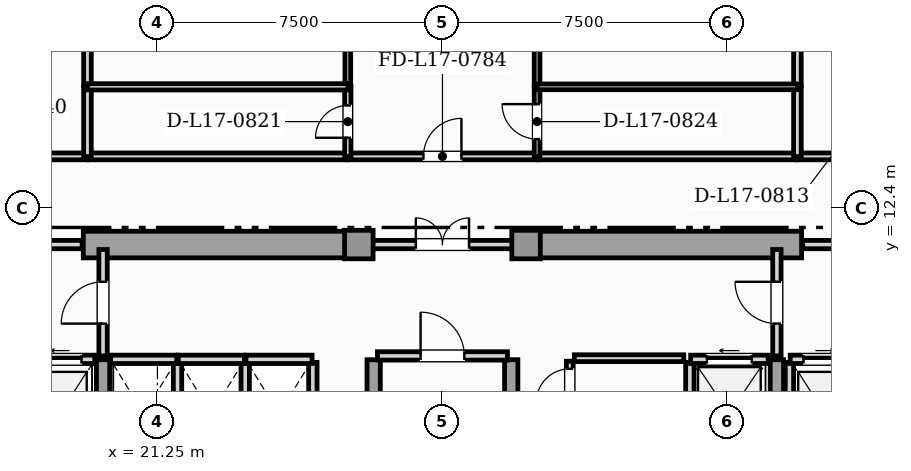
"""IFC4 building model, lengths in metres.
Left out: names, types, materials, properties, quantities, classifications, styles, units other than length and angle.
Written with IfcOpenShell. Run it as: python <this file> out.ifc"""

import sys

from ifc_helpers import new_model, si_unit, direction, frame, frame_2d, origin, origin_2d, place, context, subcontext, project, spatial, rectangle, extrude, element, fill, save


model = new_model("IFC4")
c1 = context("Model", 3, precision=1e-05, world=origin(), true_north=direction((0.0, 1.0)))
c2 = subcontext(c1, "Body", "Model", "MODEL_VIEW")
j1 = project(units=[si_unit("LENGTHUNIT", "METRE"), si_unit("PLANEANGLEUNIT", "RADIAN")], contexts=[c1])
p1 = place(None, origin())
s1 = spatial("IfcSite", under=j1, at=p1, CompositionType="ELEMENT")
p2 = place(p1, origin())
s2 = spatial("IfcBuilding", under=s1, at=p2, CompositionType="ELEMENT")
p3 = place(p2, frame((0.0, 0.0, 72.15)))
s3 = spatial("IfcBuildingStorey", under=s2, at=p3, CompositionType="ELEMENT", Elevation=72.15)
for number, where, z_axis, x_axis in (
    (1, (19.3, 11.45, 0.0), (0.0, 0.0, 1.0), (1.0, 0.0, 0.0)),
    (2, (30.9, 11.45, 0.0), (0.0, 0.0, 1.0), (1.0, 0.0, 0.0)),
):
    element("IfcWall", number, at=place(p3, frame(where, z_axis=z_axis, x_axis=x_axis)), inside=s3, PredefinedType="SHEAR", context=c2, shape_type="SweptSolid", body=[
        extrude(rectangle(XDim=7.3, YDim=0.7, at=frame_2d((3.65, 0.0))), origin(), (0.0, 0.0, 1.0), 3.57),
    ])
for number, where, z_axis, x_axis in (
    (3, (19.82, 0.92, 0.0), (0.0, 0.0, 1.0), (0.0, 1.0, 0.0)),
    (4, (26.94, 0.92, 0.0), (0.0, 0.0, 1.0), (0.0, 1.0, 0.0)),
    (5, (30.56, 0.92, 0.0), (0.0, 0.0, 1.0), (0.0, 1.0, 0.0)),
    (6, (37.55, 0.92, 0.0), (0.0, 0.0, 1.0), (0.0, 1.0, 0.0)),
):
    element("IfcWall", number, at=place(p3, frame(where, z_axis=z_axis, x_axis=x_axis)), inside=s3, PredefinedType="SHEAR", context=c2, shape_type="SweptSolid", body=[
        extrude(rectangle(XDim=7.5, YDim=0.35, at=frame_2d((3.75, 0.0))), origin(), (0.0, 0.0, 1.0), 3.57),
    ])
for number, where, z_axis, x_axis in (
    (7, (26.55, 11.45, 0.0), (0.0, 0.0, 1.0), (1.0, 0.0, 0.0)),
    (8, (30.95, 11.45, 0.0), (0.0, 0.0, 1.0), (1.0, 0.0, 0.0)),
):
    element("IfcColumn", number, at=place(p3, frame(where, z_axis=z_axis, x_axis=x_axis)), inside=s3, PredefinedType="COLUMN", context=c2, shape_type="SweptSolid", body=[
        extrude(rectangle(XDim=0.75, YDim=0.75, at=origin_2d()), origin(), (0.0, 0.0, 1.0), 3.85),
    ])
p4 = place(p3, frame((17.78, 8.43, 0.0), z_axis=(0.0, 0.0, 1.0), x_axis=(1.0, 0.0, 0.0)))
e9 = element("IfcWall", 9, at=p4, inside=s3, PredefinedType="SOLIDWALL", context=c2, shape_type="SweptSolid", body=[
    extrude(rectangle(XDim=1.82, YDim=0.22, at=frame_2d((0.91, 0.0))), origin(), (0.0, 0.0, 1.0), 3.57),
])
p5 = place(p4, frame((0.35, 0.0, 0.0)))
e10 = element("IfcOpeningElement", 10, at=p5, cuts=e9, PredefinedType="OPENING", context=c2, shape_type="SweptSolid", body=[
    extrude(rectangle(XDim=1.12, YDim=2.25, at=frame_2d((0.56, 1.125))), frame((0.0, 0.12, 0.0), z_axis=(0.0, -1.0, 0.0), x_axis=(1.0, 0.0, 0.0)), (0.0, 0.0, 1.0), 0.24),
])
p6 = place(p3, frame((37.88, 5.65, 0.0), z_axis=(0.0, 0.0, 1.0), x_axis=(0.0, 1.0, 0.0)))
e11 = element("IfcWall", 11, at=p6, inside=s3, PredefinedType="SOLIDWALL", context=c2, shape_type="SweptSolid", body=[
    extrude(rectangle(XDim=2.7, YDim=0.22, at=frame_2d((1.35, 0.0))), origin(), (0.0, 0.0, 1.0), 3.57),
])
p7 = place(p3, frame((37.9, 8.43, 0.0), z_axis=(0.0, 0.0, 1.0), x_axis=(1.0, 0.0, 0.0)))
e12 = element("IfcWall", 12, at=p7, inside=s3, PredefinedType="SOLIDWALL", context=c2, shape_type="SweptSolid", body=[
    extrude(rectangle(XDim=1.82, YDim=0.22, at=frame_2d((0.91, 0.0))), origin(), (0.0, 0.0, 1.0), 3.57),
])
p8 = place(p7, frame((0.35, 0.0, 0.0)))
e13 = element("IfcOpeningElement", 13, at=p8, cuts=e12, PredefinedType="OPENING", context=c2, shape_type="SweptSolid", body=[
    extrude(rectangle(XDim=1.12, YDim=2.25, at=frame_2d((0.56, 1.125))), frame((0.0, 0.12, 0.0), z_axis=(0.0, -1.0, 0.0), x_axis=(1.0, 0.0, 0.0)), (0.0, 0.0, 1.0), 0.24),
])
p9 = place(p3, frame((35.26, 5.65, 0.0), z_axis=(0.0, 0.0, 1.0), x_axis=(0.0, 1.0, 0.0)))
e14 = element("IfcWall", 14, at=p9, inside=s3, PredefinedType="SOLIDWALL", context=c2, shape_type="SweptSolid", body=[
    extrude(rectangle(XDim=2.7, YDim=0.22, at=frame_2d((1.35, 0.0))), origin(), (0.0, 0.0, 1.0), 3.57),
])
p10 = place(p3, frame((35.28, 8.43, 0.0), z_axis=(0.0, 0.0, 1.0), x_axis=(1.0, 0.0, 0.0)))
e15 = element("IfcWall", 15, at=p10, inside=s3, PredefinedType="SOLIDWALL", context=c2, shape_type="SweptSolid", body=[
    extrude(rectangle(XDim=2.04, YDim=0.22, at=frame_2d((1.02, 0.0))), origin(), (0.0, 0.0, 1.0), 3.57),
])
p11 = place(p10, frame((0.43, 0.0, 0.0)))
e16 = element("IfcOpeningElement", 16, at=p11, cuts=e15, PredefinedType="OPENING", context=c2, shape_type="SweptSolid", body=[
    extrude(rectangle(XDim=1.18, YDim=2.2, at=frame_2d((0.59, 1.1))), frame((0.0, 0.12, 0.0), z_axis=(0.0, -1.0, 0.0), x_axis=(1.0, 0.0, 0.0)), (0.0, 0.0, 1.0), 0.24),
])
p12 = place(p3, frame((21.78, 5.65, 0.0), z_axis=(0.0, 0.0, 1.0), x_axis=(0.0, 1.0, 0.0)))
e17 = element("IfcWall", 17, at=p12, inside=s3, PredefinedType="SOLIDWALL", context=c2, shape_type="SweptSolid", body=[
    extrude(rectangle(XDim=2.7, YDim=0.22, at=frame_2d((1.35, 0.0))), origin(), (0.0, 0.0, 1.0), 3.57),
])
p13 = place(p3, frame((20.02, 8.43, 0.0), z_axis=(0.0, 0.0, 1.0), x_axis=(1.0, 0.0, 0.0)))
e18 = element("IfcWall", 18, at=p13, inside=s3, PredefinedType="SOLIDWALL", context=c2, shape_type="SweptSolid", body=[
    extrude(rectangle(XDim=1.74, YDim=0.22, at=frame_2d((0.87, 0.0))), origin(), (0.0, 0.0, 1.0), 3.57),
])
p14 = place(p3, frame((23.56, 5.65, 0.0), z_axis=(0.0, 0.0, 1.0), x_axis=(0.0, 1.0, 0.0)))
e19 = element("IfcWall", 19, at=p14, inside=s3, PredefinedType="SOLIDWALL", context=c2, shape_type="SweptSolid", body=[
    extrude(rectangle(XDim=2.7, YDim=0.22, at=frame_2d((1.35, 0.0))), origin(), (0.0, 0.0, 1.0), 3.57),
])
p15 = place(p3, frame((21.8, 8.43, 0.0), z_axis=(0.0, 0.0, 1.0), x_axis=(1.0, 0.0, 0.0)))
e20 = element("IfcWall", 20, at=p15, inside=s3, PredefinedType="SOLIDWALL", context=c2, shape_type="SweptSolid", body=[
    extrude(rectangle(XDim=1.74, YDim=0.22, at=frame_2d((0.87, 0.0))), origin(), (0.0, 0.0, 1.0), 3.57),
])
p16 = place(p3, frame((25.34, 5.65, 0.0), z_axis=(0.0, 0.0, 1.0), x_axis=(0.0, 1.0, 0.0)))
e21 = element("IfcWall", 21, at=p16, inside=s3, PredefinedType="SOLIDWALL", context=c2, shape_type="SweptSolid", body=[
    extrude(rectangle(XDim=2.7, YDim=0.22, at=frame_2d((1.35, 0.0))), origin(), (0.0, 0.0, 1.0), 3.57),
])
p17 = place(p3, frame((23.58, 8.43, 0.0), z_axis=(0.0, 0.0, 1.0), x_axis=(1.0, 0.0, 0.0)))
e22 = element("IfcWall", 22, at=p17, inside=s3, PredefinedType="SOLIDWALL", context=c2, shape_type="SweptSolid", body=[
    extrude(rectangle(XDim=1.74, YDim=0.22, at=frame_2d((0.87, 0.0))), origin(), (0.0, 0.0, 1.0), 3.57),
])
p18 = place(p3, frame((27.04, 8.52, 0.0), z_axis=(0.0, 0.0, 1.0), x_axis=(1.0, 0.0, 0.0)))
e23 = element("IfcWall", 23, at=p18, inside=s3, PredefinedType="SOLIDWALL", context=c2, shape_type="SweptSolid", body=[
    extrude(rectangle(XDim=3.42, YDim=0.22, at=frame_2d((1.71, 0.0))), origin(), (0.0, 0.0, 1.0), 3.57),
])
p19 = place(p18, frame((1.135, 0.0, 0.0)))
e24 = element("IfcOpeningElement", 24, at=p19, cuts=e23, PredefinedType="OPENING", context=c2, shape_type="SweptSolid", body=[
    extrude(rectangle(XDim=1.15, YDim=2.2, at=frame_2d((0.575, 1.1))), frame((0.0, 0.12, 0.0), z_axis=(0.0, -1.0, 0.0), x_axis=(1.0, 0.0, 0.0)), (0.0, 0.0, 1.0), 0.24),
])
p20 = place(p3, frame((19.82, 8.52, 0.0), z_axis=(0.0, 0.0, 1.0), x_axis=(0.0, 1.0, 0.0)))
e25 = element("IfcWall", 25, at=p20, inside=s3, PredefinedType="SOLIDWALL", context=c2, shape_type="SweptSolid", body=[
    extrude(rectangle(XDim=2.8, YDim=0.22, at=frame_2d((1.4, 0.0))), origin(), (0.0, 0.0, 1.0), 3.026),
])
p21 = place(p20, frame((0.85, 0.0, 0.0)))
e26 = element("IfcOpeningElement", 26, at=p21, cuts=e25, PredefinedType="OPENING", context=c2, shape_type="SweptSolid", body=[
    extrude(rectangle(XDim=1.1, YDim=2.2, at=frame_2d((0.55, 1.1))), frame((0.0, 0.12, 0.0), z_axis=(0.0, -1.0, 0.0), x_axis=(1.0, 0.0, 0.0)), (0.0, 0.0, 1.0), 0.24),
])
p22 = place(p3, frame((37.55, 8.52, 0.0), z_axis=(0.0, 0.0, 1.0), x_axis=(0.0, 1.0, 0.0)))
e27 = element("IfcWall", 27, at=p22, inside=s3, PredefinedType="SOLIDWALL", context=c2, shape_type="SweptSolid", body=[
    extrude(rectangle(XDim=2.8, YDim=0.22, at=frame_2d((1.4, 0.0))), origin(), (0.0, 0.0, 1.0), 3.026),
])
p23 = place(p22, frame((0.85, 0.0, 0.0)))
e28 = element("IfcOpeningElement", 28, at=p23, cuts=e27, PredefinedType="OPENING", context=c2, shape_type="SweptSolid", body=[
    extrude(rectangle(XDim=1.1, YDim=2.2, at=frame_2d((0.55, 1.1))), frame((0.0, 0.12, 0.0), z_axis=(0.0, -1.0, 0.0), x_axis=(1.0, 0.0, 0.0)), (0.0, 0.0, 1.0), 0.24),
])
p24 = place(p3, frame((16.23, 11.45, 0.0), z_axis=(0.0, 0.0, 1.0), x_axis=(1.0, 0.0, 0.0)))
e29 = element("IfcWall", 29, at=p24, inside=s3, PredefinedType="SOLIDWALL", context=c2, shape_type="SweptSolid", body=[
    extrude(rectangle(XDim=3.04, YDim=0.22, at=frame_2d((1.52, 0.0))), origin(), (0.0, 0.0, 1.0), 3.57),
])
p25 = place(p24, frame((0.97, 0.0, 0.0)))
e30 = element("IfcOpeningElement", 30, at=p25, cuts=e29, PredefinedType="OPENING", context=c2, shape_type="SweptSolid", body=[
    extrude(rectangle(XDim=1.1, YDim=2.2, at=frame_2d((0.55, 1.1))), frame((0.0, 0.12, 0.0), z_axis=(0.0, -1.0, 0.0), x_axis=(1.0, 0.0, 0.0)), (0.0, 0.0, 1.0), 0.24),
])
p26 = place(p3, frame((26.63, 11.45, 0.0), z_axis=(0.0, 0.0, 1.0), x_axis=(1.0, 0.0, 0.0)))
e31 = element("IfcWall", 31, at=p26, inside=s3, PredefinedType="SOLIDWALL", context=c2, shape_type="SweptSolid", body=[
    extrude(rectangle(XDim=4.24, YDim=0.22, at=frame_2d((2.12, 0.0))), origin(), (0.0, 0.0, 1.0), 3.57),
])
p27 = place(p26, frame((1.42, 0.0, 0.0)))
e32 = element("IfcOpeningElement", 32, at=p27, cuts=e31, PredefinedType="OPENING", context=c2, shape_type="SweptSolid", body=[
    extrude(rectangle(XDim=1.4, YDim=2.2, at=frame_2d((0.7, 1.1))), frame((0.0, 0.12, 0.0), z_axis=(0.0, -1.0, 0.0), x_axis=(1.0, 0.0, 0.0)), (0.0, 0.0, 1.0), 0.24),
])
p28 = place(p3, frame((38.23, 11.45, 0.0), z_axis=(0.0, 0.0, 1.0), x_axis=(1.0, 0.0, 0.0)))
e33 = element("IfcWall", 33, at=p28, inside=s3, PredefinedType="SOLIDWALL", context=c2, shape_type="SweptSolid", body=[
    extrude(rectangle(XDim=3.04, YDim=0.22, at=frame_2d((1.52, 0.0))), origin(), (0.0, 0.0, 1.0), 3.57),
])
p29 = place(p28, frame((0.97, 0.0, 0.0)))
e34 = element("IfcOpeningElement", 34, at=p29, cuts=e33, PredefinedType="OPENING", context=c2, shape_type="SweptSolid", body=[
    extrude(rectangle(XDim=1.1, YDim=2.2, at=frame_2d((0.55, 1.1))), frame((0.0, 0.12, 0.0), z_axis=(0.0, -1.0, 0.0), x_axis=(1.0, 0.0, 0.0)), (0.0, 0.0, 1.0), 0.24),
])
p30 = place(p3, frame((32.1, 7.1, 0.0), z_axis=(0.0, 0.0, 1.0), x_axis=(0.0, 1.0, 0.0)))
e35 = element("IfcWall", 35, at=p30, inside=s3, PredefinedType="PARTITIONING", context=c2, shape_type="SweptSolid", body=[
    extrude(rectangle(XDim=1.28, YDim=0.18, at=frame_2d((0.64, 0.0))), origin(), (0.0, 0.0, 1.0), 3.57),
])
p31 = place(p30, frame((0.2, 0.0, 0.0)))
e36 = element("IfcOpeningElement", 36, at=p31, cuts=e35, PredefinedType="OPENING", context=c2, shape_type="SweptSolid", body=[
    extrude(rectangle(XDim=0.88, YDim=2.05, at=frame_2d((0.44, 1.025))), frame((0.0, 0.1, 0.0), z_axis=(0.0, -1.0, 0.0), x_axis=(1.0, 0.0, 0.0)), (0.0, 0.0, 1.0), 0.2),
])
p32 = place(p3, frame((32.22, 8.46, 0.0), z_axis=(0.0, 0.0, 1.0), x_axis=(1.0, 0.0, 0.0)))
e37 = element("IfcWall", 37, at=p32, inside=s3, PredefinedType="PARTITIONING", context=c2, shape_type="SweptSolid", body=[
    extrude(rectangle(XDim=2.88, YDim=0.18, at=frame_2d((1.44, 0.0))), origin(), (0.0, 0.0, 1.0), 3.57),
])
p33 = place(p3, frame((17.268, 13.77, 0.0), z_axis=(0.0, 0.0, 1.0), x_axis=(1.0, 0.0, 0.0)))
e38 = element("IfcWall", 38, at=p33, inside=s3, PredefinedType="PARTITIONING", context=c2, shape_type="SweptSolid", body=[
    extrude(rectangle(XDim=2.147, YDim=0.18, at=frame_2d((1.074, 0.0))), origin(), (0.0, 0.0, 1.0), 3.57),
])
p34 = place(p3, frame((38.085, 13.77, 0.0), z_axis=(0.0, 0.0, 1.0), x_axis=(1.0, 0.0, 0.0)))
e39 = element("IfcWall", 39, at=p34, inside=s3, PredefinedType="PARTITIONING", context=c2, shape_type="SweptSolid", body=[
    extrude(rectangle(XDim=2.162, YDim=0.18, at=frame_2d((1.081, 0.0))), origin(), (0.0, 0.0, 1.0), 3.57),
])
p35 = place(p3, frame((26.255, 13.77, 0.0), z_axis=(0.0, 0.0, 1.0), x_axis=(1.0, 0.0, 0.0)))
e40 = element("IfcWall", 40, at=p35, inside=s3, PredefinedType="PARTITIONING", context=c2, shape_type="SweptSolid", body=[
    extrude(rectangle(XDim=4.99, YDim=0.18, at=frame_2d((2.495, 0.0))), origin(), (0.0, 0.0, 1.0), 3.57),
])
p36 = place(p35, frame((1.995, 0.0, 0.0)))
e41 = element("IfcOpeningElement", 41, at=p36, cuts=e40, PredefinedType="OPENING", context=c2, shape_type="SweptSolid", body=[
    extrude(rectangle(XDim=1.0, YDim=2.15, at=frame_2d((0.5, 1.075))), frame((0.0, 0.1, 0.0), z_axis=(0.0, -1.0, 0.0), x_axis=(1.0, 0.0, 0.0)), (0.0, 0.0, 1.0), 0.2),
])
for number, where, z_axis, x_axis in (
    (42, (19.445, 13.77, 0.0), (0.0, 0.0, 1.0), (1.0, 0.0, 0.0)),
    (43, (31.275, 13.77, 0.0), (0.0, 0.0, 1.0), (1.0, 0.0, 0.0)),
):
    element("IfcWall", number, at=place(p3, frame(where, z_axis=z_axis, x_axis=x_axis)), inside=s3, PredefinedType="PARTITIONING", context=c2, shape_type="SweptSolid", body=[
        extrude(rectangle(XDim=6.78, YDim=0.18, at=frame_2d((3.39, 0.0))), origin(), (0.0, 0.0, 1.0), 3.57),
    ])
p37 = place(p3, frame((19.41, 13.765, 0.0), z_axis=(0.0, 0.0, 1.0), x_axis=(0.0, 1.0, 0.0)))
e44 = element("IfcWall", 44, at=p37, inside=s3, PredefinedType="PARTITIONING", context=c2, shape_type="SweptSolid", body=[
    extrude(rectangle(XDim=1.84, YDim=0.2, at=frame_2d((0.92, 0.0))), origin(), (0.0, 0.0, 1.0), 3.57),
])
p38 = place(p3, frame((19.41, 15.635, 0.0), z_axis=(0.0, 0.0, 1.0), x_axis=(0.0, 1.0, 0.0)))
e45 = element("IfcWall", 45, at=p38, inside=s3, PredefinedType="PARTITIONING", context=c2, shape_type="SweptSolid", body=[
    extrude(rectangle(XDim=3.127, YDim=0.2, at=frame_2d((1.563, 0.0))), origin(), (0.0, 0.0, 1.0), 3.57),
])
p39 = place(p3, frame((38.09, 13.765, 0.0), z_axis=(0.0, 0.0, 1.0), x_axis=(0.0, 1.0, 0.0)))
e46 = element("IfcWall", 46, at=p39, inside=s3, PredefinedType="PARTITIONING", context=c2, shape_type="SweptSolid", body=[
    extrude(rectangle(XDim=1.84, YDim=0.2, at=frame_2d((0.92, 0.0))), origin(), (0.0, 0.0, 1.0), 3.57),
])
p40 = place(p3, frame((38.09, 15.635, 0.0), z_axis=(0.0, 0.0, 1.0), x_axis=(0.0, 1.0, 0.0)))
e47 = element("IfcWall", 47, at=p40, inside=s3, PredefinedType="PARTITIONING", context=c2, shape_type="SweptSolid", body=[
    extrude(rectangle(XDim=1.6, YDim=0.2, at=frame_2d((0.8, 0.0))), origin(), (0.0, 0.0, 1.0), 3.57),
])
p41 = place(p3, frame((26.26, 13.765, 0.0), z_axis=(0.0, 0.0, 1.0), x_axis=(0.0, 1.0, 0.0)))
e48 = element("IfcWall", 48, at=p41, inside=s3, PredefinedType="PLUMBINGWALL", context=c2, shape_type="SweptSolid", body=[
    extrude(rectangle(XDim=1.84, YDim=0.165, at=frame_2d((0.92, 0.0))), origin(), (0.0, 0.0, 1.0), 3.57),
])
p42 = place(p41, frame((0.495, 0.0, 0.0)))
e49 = element("IfcOpeningElement", 49, at=p42, cuts=e48, PredefinedType="OPENING", context=c2, shape_type="SweptSolid", body=[
    extrude(rectangle(XDim=0.85, YDim=2.1, at=frame_2d((0.425, 1.05))), frame((0.0, 0.093, 0.0), z_axis=(0.0, -1.0, 0.0), x_axis=(1.0, 0.0, 0.0)), (0.0, 0.0, 1.0), 0.185),
])
p43 = place(p3, frame((26.26, 15.635, 0.0), z_axis=(0.0, 0.0, 1.0), x_axis=(0.0, 1.0, 0.0)))
e50 = element("IfcWall", 50, at=p43, inside=s3, PredefinedType="PARTITIONING", context=c2, shape_type="SweptSolid", body=[
    extrude(rectangle(XDim=7.152, YDim=0.15, at=frame_2d((3.576, 0.0))), origin(), (0.0, 0.0, 1.0), 3.57),
])
p44 = place(p43, frame((3.116, 0.0, 0.0)))
e51 = element("IfcOpeningElement", 51, at=p44, cuts=e50, PredefinedType="OPENING", context=c2, shape_type="SweptSolid", body=[
    extrude(rectangle(XDim=0.92, YDim=2.1, at=frame_2d((0.46, 1.05))), frame((0.0, 0.085, 0.0), z_axis=(0.0, -1.0, 0.0), x_axis=(1.0, 0.0, 0.0)), (0.0, 0.0, 1.0), 0.17),
])
p45 = place(p3, frame((31.24, 13.765, 0.0), z_axis=(0.0, 0.0, 1.0), x_axis=(0.0, 1.0, 0.0)))
e52 = element("IfcWall", 52, at=p45, inside=s3, PredefinedType="PARTITIONING", context=c2, shape_type="SweptSolid", body=[
    extrude(rectangle(XDim=1.84, YDim=0.15, at=frame_2d((0.92, 0.0))), origin(), (0.0, 0.0, 1.0), 3.57),
])
p46 = place(p45, frame((0.46, 0.0, 0.0)))
e53 = element("IfcOpeningElement", 53, at=p46, cuts=e52, PredefinedType="OPENING", context=c2, shape_type="SweptSolid", body=[
    extrude(rectangle(XDim=0.92, YDim=2.1, at=frame_2d((0.46, 1.05))), frame((0.0, 0.085, 0.0), z_axis=(0.0, -1.0, 0.0), x_axis=(1.0, 0.0, 0.0)), (0.0, 0.0, 1.0), 0.17),
])
p47 = place(p3, frame((31.24, 15.635, 0.0), z_axis=(0.0, 0.0, 1.0), x_axis=(0.0, 1.0, 0.0)))
e54 = element("IfcWall", 54, at=p47, inside=s3, PredefinedType="PARTITIONING", context=c2, shape_type="SweptSolid", body=[
    extrude(rectangle(XDim=5.234, YDim=0.15, at=frame_2d((2.617, 0.0))), origin(), (0.0, 0.0, 1.0), 3.57),
])
p48 = place(p47, frame((2.157, 0.0, 0.0)))
e55 = element("IfcOpeningElement", 55, at=p48, cuts=e54, PredefinedType="OPENING", context=c2, shape_type="SweptSolid", body=[
    extrude(rectangle(XDim=0.92, YDim=2.1, at=frame_2d((0.46, 1.05))), frame((0.0, 0.085, 0.0), z_axis=(0.0, -1.0, 0.0), x_axis=(1.0, 0.0, 0.0)), (0.0, 0.0, 1.0), 0.17),
])
p49 = place(p3, frame((19.405, 15.6, 0.0), z_axis=(0.0, 0.0, 1.0), x_axis=(1.0, 0.0, 0.0)))
e56 = element("IfcWall", 56, at=p49, inside=s3, PredefinedType="PLUMBINGWALL", context=c2, shape_type="SweptSolid", body=[
    extrude(rectangle(XDim=6.86, YDim=0.165, at=frame_2d((3.43, 0.0))), origin(), (0.0, 0.0, 1.0), 3.57),
])
p50 = place(p3, frame((31.235, 15.6, 0.0), z_axis=(0.0, 0.0, 1.0), x_axis=(1.0, 0.0, 0.0)))
e57 = element("IfcWall", 57, at=p50, inside=s3, PredefinedType="PARTITIONING", context=c2, shape_type="SweptSolid", body=[
    extrude(rectangle(XDim=6.86, YDim=0.15, at=frame_2d((3.43, 0.0))), origin(), (0.0, 0.0, 1.0), 3.57),
])
p51 = place(p5, origin())
e58 = element("IfcDoor", 58, at=p51, inside=s3, OperationType="SLIDING_TO_LEFT", PredefinedType="DOOR", context=c2, shape_type="SweptSolid", body=[
    extrude(rectangle(XDim=1.12, YDim=2.25, at=frame_2d((0.56, 1.125))), frame((0.0, 0.025, 0.0), z_axis=(0.0, -1.0, 0.0), x_axis=(1.0, 0.0, 0.0)), (0.0, 0.0, 1.0), 0.05),
])
fill(e10, e58)
p52 = place(p8, origin())
e59 = element("IfcDoor", 59, at=p52, inside=s3, OperationType="SLIDING_TO_RIGHT", PredefinedType="DOOR", context=c2, shape_type="SweptSolid", body=[
    extrude(rectangle(XDim=1.12, YDim=2.25, at=frame_2d((0.56, 1.125))), frame((0.0, 0.025, 0.0), z_axis=(0.0, -1.0, 0.0), x_axis=(1.0, 0.0, 0.0)), (0.0, 0.0, 1.0), 0.05),
])
fill(e13, e59)
p53 = place(p11, origin())
e60 = element("IfcDoor", 60, at=p53, inside=s3, OperationType="SLIDING_TO_LEFT", PredefinedType="DOOR", context=c2, shape_type="SweptSolid", body=[
    extrude(rectangle(XDim=1.18, YDim=2.2, at=frame_2d((0.59, 1.1))), frame((0.0, 0.025, 0.0), z_axis=(0.0, -1.0, 0.0), x_axis=(1.0, 0.0, 0.0)), (0.0, 0.0, 1.0), 0.05),
])
fill(e16, e60)
p54 = place(p19, origin())
e61 = element("IfcDoor", 61, at=p54, inside=s3, OperationType="SINGLE_SWING_LEFT", PredefinedType="DOOR", context=c2, shape_type="SweptSolid", body=[
    extrude(rectangle(XDim=1.15, YDim=2.2, at=frame_2d((0.575, 1.1))), frame((0.0, 0.025, 0.0), z_axis=(0.0, -1.0, 0.0), x_axis=(1.0, 0.0, 0.0)), (0.0, 0.0, 1.0), 0.05),
])
fill(e24, e61)
p55 = place(p21, origin())
e62 = element("IfcDoor", 62, at=p55, inside=s3, OperationType="SINGLE_SWING_LEFT", PredefinedType="DOOR", context=c2, shape_type="SweptSolid", body=[
    extrude(rectangle(XDim=1.1, YDim=2.2, at=frame_2d((0.55, 1.1))), frame((0.0, 0.025, 0.0), z_axis=(0.0, -1.0, 0.0), x_axis=(1.0, 0.0, 0.0)), (0.0, 0.0, 1.0), 0.05),
])
fill(e26, e62)
p56 = place(p23, origin())
e63 = element("IfcDoor", 63, at=p56, inside=s3, OperationType="SINGLE_SWING_RIGHT", PredefinedType="DOOR", context=c2, shape_type="SweptSolid", body=[
    extrude(rectangle(XDim=1.1, YDim=2.2, at=frame_2d((0.55, 1.1))), frame((0.0, 0.025, 0.0), z_axis=(0.0, -1.0, 0.0), x_axis=(1.0, 0.0, 0.0)), (0.0, 0.0, 1.0), 0.05),
])
fill(e28, e63)
p57 = place(p27, origin())
e64 = element("IfcDoor", 64, at=p57, inside=s3, OperationType="DOUBLE_DOOR_SINGLE_SWING", PredefinedType="DOOR", context=c2, shape_type="SweptSolid", body=[
    extrude(rectangle(XDim=1.4, YDim=2.2, at=frame_2d((0.7, 1.1))), frame((0.0, 0.025, 0.0), z_axis=(0.0, -1.0, 0.0), x_axis=(1.0, 0.0, 0.0)), (0.0, 0.0, 1.0), 0.05),
])
fill(e32, e64)
p58 = place(p31, origin())
e65 = element("IfcDoor", 65, at=p58, inside=s3, OperationType="SINGLE_SWING_LEFT", PredefinedType="DOOR", context=c2, shape_type="SweptSolid", body=[
    extrude(rectangle(XDim=0.88, YDim=2.05, at=frame_2d((0.44, 1.025))), frame((0.0, 0.025, 0.0), z_axis=(0.0, -1.0, 0.0), x_axis=(1.0, 0.0, 0.0)), (0.0, 0.0, 1.0), 0.05),
])
fill(e36, e65)
p59 = place(p36, origin())
e66 = element("IfcDoor", 66, at=p59, inside=s3, OperationType="SINGLE_SWING_RIGHT", PredefinedType="DOOR", context=c2, shape_type="SweptSolid", body=[
    extrude(rectangle(XDim=1.0, YDim=2.15, at=frame_2d((0.5, 1.075))), frame((0.0, 0.025, 0.0), z_axis=(0.0, -1.0, 0.0), x_axis=(1.0, 0.0, 0.0)), (0.0, 0.0, 1.0), 0.05),
])
fill(e41, e66)
p60 = place(p42, origin())
e67 = element("IfcDoor", 67, at=p60, inside=s3, OperationType="SINGLE_SWING_LEFT", PredefinedType="DOOR", context=c2, shape_type="SweptSolid", body=[
    extrude(rectangle(XDim=0.85, YDim=2.1, at=frame_2d((0.425, 1.05))), frame((0.0, 0.025, 0.0), z_axis=(0.0, -1.0, 0.0), x_axis=(1.0, 0.0, 0.0)), (0.0, 0.0, 1.0), 0.05),
])
fill(e49, e67)
p61 = place(p46, origin())
e68 = element("IfcDoor", 68, at=p61, inside=s3, OperationType="SINGLE_SWING_RIGHT", PredefinedType="DOOR", context=c2, shape_type="SweptSolid", body=[
    extrude(rectangle(XDim=0.92, YDim=2.1, at=frame_2d((0.46, 1.05))), frame((0.0, 0.025, 0.0), z_axis=(0.0, -1.0, 0.0), x_axis=(1.0, 0.0, 0.0)), (0.0, 0.0, 1.0), 0.05),
])
fill(e53, e68)
save(model, sys.argv[1])
